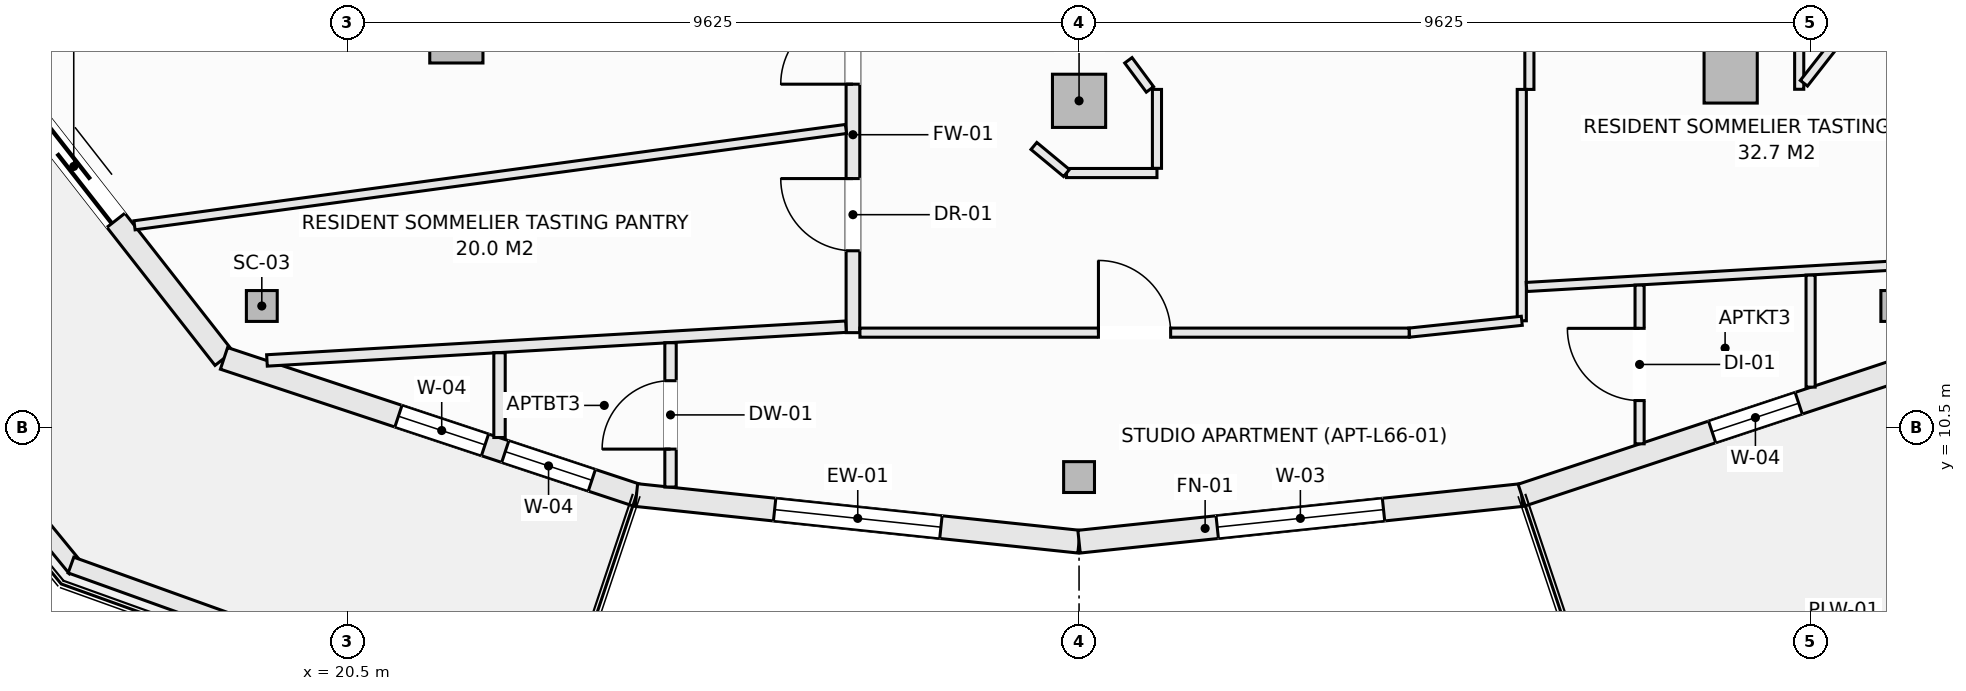
"""IFC4 building model, lengths in metres.
Left out: names, types, materials, properties, quantities, classifications, styles, units other than length and angle.
Written with IfcOpenShell. Run it as: python <this file> out.ifc"""

import sys

from ifc_helpers import new_model, si_unit, direction, frame, frame_2d, origin, origin_2d, place, context, subcontext, project, spatial, rectangle, hollow_rectangle, extrude, element, fill, save


model = new_model("IFC4")
c1 = context("Model", 3, precision=1e-05, world=origin(), true_north=direction((0.0, 1.0)))
c2 = subcontext(c1, "Body", "Model", "MODEL_VIEW")
j1 = project(units=[si_unit("LENGTHUNIT", "METRE"), si_unit("PLANEANGLEUNIT", "RADIAN")], contexts=[c1])
p1 = place(None, origin())
s1 = spatial("IfcSite", under=j1, at=p1, CompositionType="ELEMENT")
p2 = place(p1, origin())
s2 = spatial("IfcBuilding", under=s1, at=p2, CompositionType="ELEMENT")
p3 = place(p2, frame((0.0, 0.0, 245.9)))
s3 = spatial("IfcBuildingStorey", under=s2, at=p3, CompositionType="ELEMENT", Elevation=245.9)
for number, where, z_axis, x_axis in (
    (1, (19.372, 12.101, -0.27), (0.0, 0.0, 1.0), (1.0, 0.0, 0.0)),
    (2, (30.125, 9.85, -0.27), (0.0, 0.0, 1.0), (1.0, 0.0, 0.0)),
    (3, (40.878, 12.101, -0.27), (0.0, 0.0, 1.0), (1.0, 0.0, 0.0)),
):
    element("IfcColumn", number, at=place(p3, frame(where, z_axis=z_axis, x_axis=x_axis)), inside=s3, PredefinedType="COLUMN", context=c2, shape_type="SweptSolid", body=[
        extrude(hollow_rectangle(XDim=0.406, YDim=0.406, WallThickness=0.016, at=origin_2d()), origin(), (0.0, 0.0, 1.0), 3.3),
    ])
for number, where, z_axis, x_axis in (
    (4, (21.932, 15.648, -0.27), (0.0, 0.0, 1.0), (1.0, 0.0, 0.0)),
    (5, (30.125, 14.8, -0.27), (0.0, 0.0, 1.0), (1.0, 0.0, 0.0)),
    (6, (38.698, 15.121, -0.27), (0.0, 0.0, 1.0), (1.0, 0.0, 0.0)),
):
    element("IfcColumn", number, at=place(p3, frame(where, z_axis=z_axis, x_axis=x_axis)), inside=s3, PredefinedType="COLUMN", context=c2, shape_type="SweptSolid", body=[
        extrude(rectangle(XDim=0.7, YDim=0.7, at=origin_2d()), origin(), (0.0, 0.0, 1.0), 3.3),
    ])
p4 = place(p3, frame((15.573, 15.63, 0.0), z_axis=(0.0, 0.0, 1.0), x_axis=(0.61644588519, -0.787397276241, 0.0)))
e7 = element("IfcWall", 7, at=p4, inside=s3, PredefinedType="SOLIDWALL", context=c2, shape_type="SweptSolid", body=[
    extrude(rectangle(XDim=5.357, YDim=0.3, at=frame_2d((2.678, 0.0))), origin(), (0.0, 0.0, 1.0), 2.605),
])
p5 = place(p4, frame((1.25, 0.0, 0.0)))
e8 = element("IfcOpeningElement", 8, at=p5, cuts=e7, PredefinedType="OPENING", context=c2, shape_type="SweptSolid", body=[
    extrude(rectangle(XDim=1.8, YDim=2.25, at=frame_2d((0.9, 1.125))), frame((0.0, 0.16, 0.0), z_axis=(0.0, -1.0, 0.0), x_axis=(1.0, 0.0, 0.0)), (0.0, 0.0, 1.0), 0.32),
])
p6 = place(p3, frame((18.875, 11.412, 0.0), z_axis=(0.0, 0.0, 1.0), x_axis=(0.949232769585, -0.314574552605, 0.0)))
e9 = element("IfcWall", 9, at=p6, inside=s3, PredefinedType="SOLIDWALL", context=c2, shape_type="SweptSolid", body=[
    extrude(rectangle(XDim=5.717, YDim=0.3, at=frame_2d((2.858, 0.0))), origin(), (0.0, 0.0, 1.0), 2.605),
])
p7 = place(p6, frame((2.417, 0.0, 0.72)))
e10 = element("IfcOpeningElement", 10, at=p7, cuts=e9, PredefinedType="OPENING", context=c2, shape_type="SweptSolid", body=[
    extrude(rectangle(XDim=1.2, YDim=1.65, at=frame_2d((0.6, 0.825))), frame((0.0, 0.16, 0.0), z_axis=(0.0, -1.0, 0.0), x_axis=(1.0, 0.0, 0.0)), (0.0, 0.0, 1.0), 0.32),
])
p8 = place(p6, frame((3.898, 0.0, 0.72)))
e11 = element("IfcOpeningElement", 11, at=p8, cuts=e9, PredefinedType="OPENING", context=c2, shape_type="SweptSolid", body=[
    extrude(rectangle(XDim=1.2, YDim=1.65, at=frame_2d((0.6, 0.825))), frame((0.0, 0.16, 0.0), z_axis=(0.0, -1.0, 0.0), x_axis=(1.0, 0.0, 0.0)), (0.0, 0.0, 1.0), 0.32),
])
p9 = place(p3, frame((24.302, 9.613, 0.0), z_axis=(0.0, 0.0, 1.0), x_axis=(0.994500425783, -0.10473253132, 0.0)))
e12 = element("IfcWall", 12, at=p9, inside=s3, PredefinedType="SOLIDWALL", context=c2, shape_type="SweptSolid", body=[
    extrude(rectangle(XDim=5.856, YDim=0.3, at=frame_2d((2.928, 0.0))), origin(), (0.0, 0.0, 1.0), 2.605),
])
p10 = place(p9, frame((1.828, 0.0, 0.72)))
e13 = element("IfcOpeningElement", 13, at=p10, cuts=e12, PredefinedType="OPENING", context=c2, shape_type="SweptSolid", body=[
    extrude(rectangle(XDim=2.2, YDim=1.65, at=frame_2d((1.1, 0.825))), frame((0.0, 0.16, 0.0), z_axis=(0.0, -1.0, 0.0), x_axis=(1.0, 0.0, 0.0)), (0.0, 0.0, 1.0), 0.32),
])
p11 = place(p3, frame((30.125, 9.0, 0.0), z_axis=(0.0, 0.0, 1.0), x_axis=(0.994500425783, 0.10473253132, 0.0)))
e14 = element("IfcWall", 14, at=p11, inside=s3, PredefinedType="SOLIDWALL", context=c2, shape_type="SweptSolid", body=[
    extrude(rectangle(XDim=5.856, YDim=0.3, at=frame_2d((2.928, 0.0))), origin(), (0.0, 0.0, 1.0), 2.605),
])
p12 = place(p11, frame((1.828, 0.0, 0.72)))
e15 = element("IfcOpeningElement", 15, at=p12, cuts=e14, PredefinedType="OPENING", context=c2, shape_type="SweptSolid", body=[
    extrude(rectangle(XDim=2.2, YDim=1.65, at=frame_2d((1.1, 0.825))), frame((0.0, 0.16, 0.0), z_axis=(0.0, -1.0, 0.0), x_axis=(1.0, 0.0, 0.0)), (0.0, 0.0, 1.0), 0.32),
])
p13 = place(p3, frame((35.948, 9.613, 0.0), z_axis=(0.0, 0.0, 1.0), x_axis=(0.949232769585, 0.314574552605, 0.0)))
e16 = element("IfcWall", 16, at=p13, inside=s3, PredefinedType="SOLIDWALL", context=c2, shape_type="SweptSolid", body=[
    extrude(rectangle(XDim=5.717, YDim=0.3, at=frame_2d((2.858, 0.0))), origin(), (0.0, 0.0, 1.0), 2.605),
])
p14 = place(p13, frame((2.64, 0.0, 0.72)))
e17 = element("IfcOpeningElement", 17, at=p14, cuts=e16, PredefinedType="OPENING", context=c2, shape_type="SweptSolid", body=[
    extrude(rectangle(XDim=1.2, YDim=1.65, at=frame_2d((0.6, 0.825))), frame((0.0, 0.16, 0.0), z_axis=(0.0, -1.0, 0.0), x_axis=(1.0, 0.0, 0.0)), (0.0, 0.0, 1.0), 0.32),
])
p15 = place(p3, frame((12.882, 13.579, 0.0), z_axis=(0.0, 0.0, 1.0), x_axis=(0.63407318032, -0.77327304492, 0.0)))
e18 = element("IfcWall", 18, at=p15, inside=s3, PredefinedType="PARAPET", context=c2, shape_type="SweptSolid", body=[
    extrude(rectangle(XDim=6.379, YDim=0.22, at=frame_2d((3.189, 0.0))), origin(), (0.0, 0.0, 1.0), 0.52),
])
for number, where, z_axis, x_axis in (
    (19, (16.862, 8.692, 0.0), (0.0, 0.0, 1.0), (0.941, -0.338, 0.0)),
    (20, (36.982, 6.392, 0.0), (0.0, 0.0, 1.0), (0.941, 0.338, 0.0)),
):
    element("IfcWall", number, at=place(p3, frame(where, z_axis=z_axis, x_axis=x_axis)), inside=s3, PredefinedType="PARAPET", context=c2, shape_type="SweptSolid", body=[
        extrude(rectangle(XDim=6.807, YDim=0.22, at=frame_2d((3.403, 0.0))), origin(), (0.0, 0.0, 1.0), 0.52),
    ])
p16 = place(p3, frame((27.15, 11.75, 0.0), z_axis=(0.0, 0.0, 1.0), x_axis=(0.0, 1.0, 0.0)))
e21 = element("IfcWall", 21, at=p16, inside=s3, PredefinedType="SOLIDWALL", context=c2, shape_type="SweptSolid", body=[
    extrude(rectangle(XDim=5.208, YDim=0.18, at=frame_2d((2.604, 0.0))), origin(), (0.0, 0.0, 1.0), 3.03),
])
p17 = place(p16, frame((3.269, 0.0, 0.0)))
e22 = element("IfcOpeningElement", 22, at=p17, cuts=e21, PredefinedType="OPENING", context=c2, shape_type="SweptSolid", body=[
    extrude(rectangle(XDim=0.95, YDim=2.1, at=frame_2d((0.475, 1.05))), frame((0.0, 0.1, 0.0), z_axis=(0.0, -1.0, 0.0), x_axis=(1.0, 0.0, 0.0)), (0.0, 0.0, 1.0), 0.2),
])
p18 = place(p16, frame((1.077, 0.0, 0.0)))
e23 = element("IfcOpeningElement", 23, at=p18, cuts=e21, PredefinedType="OPENING", context=c2, shape_type="SweptSolid", body=[
    extrude(rectangle(XDim=0.95, YDim=2.1, at=frame_2d((0.475, 1.05))), frame((0.0, 0.1, 0.0), z_axis=(0.0, -1.0, 0.0), x_axis=(1.0, 0.0, 0.0)), (0.0, 0.0, 1.0), 0.2),
])
p19 = place(p3, frame((39.6, 14.952, 0.0), z_axis=(0.0, 0.0, 1.0), x_axis=(0.0, 1.0, 0.0)))
e24 = element("IfcWall", 24, at=p19, inside=s3, PredefinedType="PARTITIONING", context=c2, shape_type="SweptSolid", body=[
    extrude(rectangle(XDim=8.068, YDim=0.12, at=frame_2d((4.034, 0.0))), origin(), (0.0, 0.0, 1.0), 2.478),
])
p20 = place(p19, frame((1.5, 0.0, 0.0)))
e25 = element("IfcOpeningElement", 25, at=p20, cuts=e24, PredefinedType="OPENING", context=c2, shape_type="SweptSolid", body=[
    extrude(rectangle(XDim=0.95, YDim=2.1, at=frame_2d((0.475, 1.05))), frame((0.0, 0.07, 0.0), z_axis=(0.0, -1.0, 0.0), x_axis=(1.0, 0.0, 0.0)), (0.0, 0.0, 1.0), 0.14),
])
p21 = place(p3, frame((39.662, 15.031, 0.0), z_axis=(0.0, 0.0, 1.0), x_axis=(0.616497420092, 0.787356927334, 0.0)))
e26 = element("IfcWall", 26, at=p21, inside=s3, PredefinedType="PARTITIONING", context=c2, shape_type="SweptSolid", body=[
    extrude(rectangle(XDim=2.958, YDim=0.12, at=frame_2d((1.479, 0.0))), origin(), (0.0, 0.0, 1.0), 3.03),
])
p22 = place(p3, frame((36.05, 14.95, 0.0), z_axis=(0.0, 0.0, 1.0), x_axis=(0.0, 1.0, 0.0)))
e27 = element("IfcWall", 27, at=p22, inside=s3, PredefinedType="PARTITIONING", context=c2, shape_type="SweptSolid", body=[
    extrude(rectangle(XDim=2.593, YDim=0.12, at=frame_2d((1.296, 0.0))), origin(), (0.0, 0.0, 1.0), 3.03),
])
p23 = place(p3, frame((35.95, 11.906, 0.0), z_axis=(0.0, 0.0, 1.0), x_axis=(0.0, 1.0, 0.0)))
e28 = element("IfcWall", 28, at=p23, inside=s3, PredefinedType="PARTITIONING", context=c2, shape_type="SweptSolid", body=[
    extrude(rectangle(XDim=3.044, YDim=0.12, at=frame_2d((1.522, 0.0))), origin(), (0.0, 0.0, 1.0), 3.03),
])
p24 = place(p3, frame((34.468, 11.75, 0.0), z_axis=(0.0, 0.0, 1.0), x_axis=(0.994504555135, 0.104693313135, 0.0)))
e29 = element("IfcWall", 29, at=p24, inside=s3, PredefinedType="PARTITIONING", context=c2, shape_type="SweptSolid", body=[
    extrude(rectangle(XDim=1.49, YDim=0.12, at=frame_2d((0.745, 0.0))), origin(), (0.0, 0.0, 1.0), 3.03),
])
p25 = place(p3, frame((27.242, 11.75, 0.0), z_axis=(0.0, 0.0, 1.0), x_axis=(1.0, 0.0, 0.0)))
e30 = element("IfcWall", 30, at=p25, inside=s3, PredefinedType="PARTITIONING", context=c2, shape_type="SweptSolid", body=[
    extrude(rectangle(XDim=7.226, YDim=0.12, at=frame_2d((3.613, 0.0))), origin(), (0.0, 0.0, 1.0), 3.03),
])
p26 = place(p25, frame((3.138, 0.0, 0.0)))
e31 = element("IfcOpeningElement", 31, at=p26, cuts=e30, PredefinedType="OPENING", context=c2, shape_type="SweptSolid", body=[
    extrude(rectangle(XDim=0.95, YDim=2.1, at=frame_2d((0.475, 1.05))), frame((0.0, 0.07, 0.0), z_axis=(0.0, -1.0, 0.0), x_axis=(1.0, 0.0, 0.0)), (0.0, 0.0, 1.0), 0.14),
])
p27 = place(p3, frame((29.96, 13.85, 0.0), z_axis=(0.0, 0.0, 1.0), x_axis=(1.0, 0.0, 0.0)))
e32 = element("IfcWall", 32, at=p27, inside=s3, PredefinedType="PARTITIONING", context=c2, shape_type="SweptSolid", body=[
    extrude(rectangle(XDim=1.19, YDim=0.12, at=frame_2d((0.595, 0.0))), origin(), (0.0, 0.0, 1.0), 3.03),
])
p28 = place(p3, frame((31.15, 13.912, 0.0), z_axis=(0.0, 0.0, 1.0), x_axis=(0.0, 1.0, 0.0)))
e33 = element("IfcWall", 33, at=p28, inside=s3, PredefinedType="PARTITIONING", context=c2, shape_type="SweptSolid", body=[
    extrude(rectangle(XDim=1.038, YDim=0.12, at=frame_2d((0.519, 0.0))), origin(), (0.0, 0.0, 1.0), 3.03),
])
p29 = place(p3, frame((30.774, 15.333, 0.0), z_axis=(0.0, 0.0, 1.0), x_axis=(0.595814974861, -0.803121731577, 0.0)))
e34 = element("IfcWall", 34, at=p29, inside=s3, PredefinedType="PARTITIONING", context=c2, shape_type="SweptSolid", body=[
    extrude(rectangle(XDim=0.477, YDim=0.12, at=frame_2d((0.239, 0.0))), origin(), (0.0, 0.0, 1.0), 3.03),
])
p30 = place(p3, frame((29.531, 14.206, 0.0), z_axis=(0.0, 0.0, 1.0), x_axis=(0.7695479554, -0.638589026166, 0.0)))
e35 = element("IfcWall", 35, at=p30, inside=s3, PredefinedType="PARTITIONING", context=c2, shape_type="SweptSolid", body=[
    extrude(rectangle(XDim=0.557, YDim=0.12, at=frame_2d((0.279, 0.0))), origin(), (0.0, 0.0, 1.0), 3.03),
])
p31 = place(p3, frame((17.698, 13.162, 0.0), z_axis=(0.0, 0.0, 1.0), x_axis=(0.990958840374, 0.134166227808, 0.0)))
e36 = element("IfcWall", 36, at=p31, inside=s3, PredefinedType="PARTITIONING", context=c2, shape_type="SweptSolid", body=[
    extrude(rectangle(XDim=9.446, YDim=0.12, at=frame_2d((4.723, 0.0))), origin(), (0.0, 0.0, 1.0), 3.03),
])
p32 = place(p3, frame((19.44, 11.384, 0.0), z_axis=(0.0, 0.0, 1.0), x_axis=(0.998303266402, 0.058228758288, 0.0)))
e37 = element("IfcWall", 37, at=p32, inside=s3, PredefinedType="PARTITIONING", context=c2, shape_type="SweptSolid", body=[
    extrude(rectangle(XDim=7.631, YDim=0.15, at=frame_2d((3.815, 0.0))), origin(), (0.0, 0.0, 1.0), 2.605),
])
p33 = place(p3, frame((36.012, 12.351, 0.0), z_axis=(0.0, 0.0, 1.0), x_axis=(0.998301967663, 0.058251020246, 0.0)))
e38 = element("IfcWall", 38, at=p33, inside=s3, PredefinedType="PARTITIONING", context=c2, shape_type="SweptSolid", body=[
    extrude(rectangle(XDim=6.199, YDim=0.12, at=frame_2d((3.099, 0.0))), origin(), (0.0, 0.0, 1.0), 2.605),
])
p34 = place(p3, frame((24.75, 9.719, 0.0), z_axis=(0.0, 0.0, 1.0), x_axis=(0.0, 1.0, 0.0)))
e39 = element("IfcWall", 39, at=p34, inside=s3, PredefinedType="PARTITIONING", context=c2, shape_type="SweptSolid", body=[
    extrude(rectangle(XDim=1.898, YDim=0.15, at=frame_2d((0.949, 0.0))), origin(), (0.0, 0.0, 1.0), 2.77),
])
p35 = place(p34, frame((0.499, 0.0, 0.0)))
e40 = element("IfcOpeningElement", 40, at=p35, cuts=e39, PredefinedType="OPENING", context=c2, shape_type="SweptSolid", body=[
    extrude(rectangle(XDim=0.9, YDim=2.1, at=frame_2d((0.45, 1.05))), frame((0.0, 0.085, 0.0), z_axis=(0.0, -1.0, 0.0), x_axis=(1.0, 0.0, 0.0)), (0.0, 0.0, 1.0), 0.17),
])
p36 = place(p3, frame((37.5, 10.288, 0.0), z_axis=(0.0, 0.0, 1.0), x_axis=(0.0, 1.0, 0.0)))
e41 = element("IfcWall", 41, at=p36, inside=s3, PredefinedType="PARTITIONING", context=c2, shape_type="SweptSolid", body=[
    extrude(rectangle(XDim=2.088, YDim=0.12, at=frame_2d((1.044, 0.0))), origin(), (0.0, 0.0, 1.0), 3.03),
])
p37 = place(p36, frame((0.569, 0.0, 0.0)))
e42 = element("IfcOpeningElement", 42, at=p37, cuts=e41, PredefinedType="OPENING", context=c2, shape_type="SweptSolid", body=[
    extrude(rectangle(XDim=0.95, YDim=2.1, at=frame_2d((0.475, 1.05))), frame((0.0, 0.07, 0.0), z_axis=(0.0, -1.0, 0.0), x_axis=(1.0, 0.0, 0.0)), (0.0, 0.0, 1.0), 0.14),
])
p38 = place(p3, frame((39.75, 11.033, 0.0), z_axis=(0.0, 0.0, 1.0), x_axis=(0.0, 1.0, 0.0)))
e43 = element("IfcWall", 43, at=p38, inside=s3, PredefinedType="PARTITIONING", context=c2, shape_type="SweptSolid", body=[
    extrude(rectangle(XDim=1.474, YDim=0.12, at=frame_2d((0.737, 0.0))), origin(), (0.0, 0.0, 1.0), 3.03),
])
p39 = place(p3, frame((22.5, 10.37, 0.0), z_axis=(0.0, 0.0, 1.0), x_axis=(0.0, 1.0, 0.0)))
e44 = element("IfcWall", 44, at=p39, inside=s3, PredefinedType="PARTITIONING", context=c2, shape_type="SweptSolid", body=[
    extrude(rectangle(XDim=1.115, YDim=0.15, at=frame_2d((0.558, 0.0))), origin(), (0.0, 0.0, 1.0), 3.03),
])
p40 = place(p5, frame((1.8, 0.0, 0.0), z_axis=(0.0, 0.0, 1.0), x_axis=(-1.0, 0.0, 0.0)))
e45 = element("IfcDoor", 45, at=p40, inside=s3, OperationType="SLIDING_TO_LEFT", PredefinedType="DOOR", context=c2, shape_type="SweptSolid", body=[
    extrude(rectangle(XDim=1.8, YDim=2.25, at=frame_2d((0.9, 1.125))), frame((0.0, 0.025, 0.0), z_axis=(0.0, -1.0, 0.0), x_axis=(1.0, 0.0, 0.0)), (0.0, 0.0, 1.0), 0.05),
])
fill(e8, e45)
p41 = place(p7, origin())
e46 = element("IfcWindow", 46, at=p41, inside=s3, PartitioningType="SINGLE_PANEL", PredefinedType="WINDOW", context=c2, shape_type="SweptSolid", body=[
    extrude(rectangle(XDim=1.2, YDim=1.65, at=frame_2d((0.6, 0.825))), frame((0.0, 0.03, 0.0), z_axis=(0.0, -1.0, 0.0), x_axis=(1.0, 0.0, 0.0)), (0.0, 0.0, 1.0), 0.06),
])
fill(e10, e46)
p42 = place(p10, origin())
e47 = element("IfcWindow", 47, at=p42, inside=s3, PartitioningType="SINGLE_PANEL", PredefinedType="WINDOW", context=c2, shape_type="SweptSolid", body=[
    extrude(rectangle(XDim=2.2, YDim=1.65, at=frame_2d((1.1, 0.825))), frame((0.0, 0.03, 0.0), z_axis=(0.0, -1.0, 0.0), x_axis=(1.0, 0.0, 0.0)), (0.0, 0.0, 1.0), 0.06),
])
fill(e13, e47)
p43 = place(p12, origin())
e48 = element("IfcWindow", 48, at=p43, inside=s3, PartitioningType="SINGLE_PANEL", PredefinedType="WINDOW", context=c2, shape_type="SweptSolid", body=[
    extrude(rectangle(XDim=2.2, YDim=1.65, at=frame_2d((1.1, 0.825))), frame((0.0, 0.03, 0.0), z_axis=(0.0, -1.0, 0.0), x_axis=(1.0, 0.0, 0.0)), (0.0, 0.0, 1.0), 0.06),
])
fill(e15, e48)
p44 = place(p14, origin())
e49 = element("IfcWindow", 49, at=p44, inside=s3, PartitioningType="SINGLE_PANEL", PredefinedType="WINDOW", context=c2, shape_type="SweptSolid", body=[
    extrude(rectangle(XDim=1.2, YDim=1.65, at=frame_2d((0.6, 0.825))), frame((0.0, 0.03, 0.0), z_axis=(0.0, -1.0, 0.0), x_axis=(1.0, 0.0, 0.0)), (0.0, 0.0, 1.0), 0.06),
])
fill(e17, e49)
p45 = place(p17, origin())
e50 = element("IfcDoor", 50, at=p45, inside=s3, OperationType="SINGLE_SWING_LEFT", PredefinedType="DOOR", context=c2, shape_type="SweptSolid", body=[
    extrude(rectangle(XDim=0.95, YDim=2.1, at=frame_2d((0.475, 1.05))), frame((0.0, 0.025, 0.0), z_axis=(0.0, -1.0, 0.0), x_axis=(1.0, 0.0, 0.0)), (0.0, 0.0, 1.0), 0.05),
])
fill(e22, e50)
p46 = place(p18, origin())
e51 = element("IfcDoor", 51, at=p46, inside=s3, OperationType="SINGLE_SWING_RIGHT", PredefinedType="DOOR", context=c2, shape_type="SweptSolid", body=[
    extrude(rectangle(XDim=0.95, YDim=2.1, at=frame_2d((0.475, 1.05))), frame((0.0, 0.025, 0.0), z_axis=(0.0, -1.0, 0.0), x_axis=(1.0, 0.0, 0.0)), (0.0, 0.0, 1.0), 0.05),
])
fill(e23, e51)
p47 = place(p26, origin())
e52 = element("IfcDoor", 52, at=p47, inside=s3, OperationType="SINGLE_SWING_LEFT", PredefinedType="DOOR", context=c2, shape_type="SweptSolid", body=[
    extrude(rectangle(XDim=0.95, YDim=2.1, at=frame_2d((0.475, 1.05))), frame((0.0, 0.025, 0.0), z_axis=(0.0, -1.0, 0.0), x_axis=(1.0, 0.0, 0.0)), (0.0, 0.0, 1.0), 0.05),
])
fill(e31, e52)
p48 = place(p37, origin())
e53 = element("IfcDoor", 53, at=p48, inside=s3, OperationType="SINGLE_SWING_RIGHT", PredefinedType="DOOR", context=c2, shape_type="SweptSolid", body=[
    extrude(rectangle(XDim=0.95, YDim=2.1, at=frame_2d((0.475, 1.05))), frame((0.0, 0.025, 0.0), z_axis=(0.0, -1.0, 0.0), x_axis=(1.0, 0.0, 0.0)), (0.0, 0.0, 1.0), 0.05),
])
fill(e42, e53)
p49 = place(p35, origin())
e54 = element("IfcDoor", 54, at=p49, inside=s3, OperationType="SINGLE_SWING_LEFT", PredefinedType="DOOR", context=c2, shape_type="SweptSolid", body=[
    extrude(rectangle(XDim=0.9, YDim=2.1, at=frame_2d((0.45, 1.05))), frame((0.0, 0.025, 0.0), z_axis=(0.0, -1.0, 0.0), x_axis=(1.0, 0.0, 0.0)), (0.0, 0.0, 1.0), 0.05),
])
fill(e40, e54)
p50 = place(p8, origin())
e55 = element("IfcWindow", 55, at=p50, inside=s3, PartitioningType="SINGLE_PANEL", PredefinedType="WINDOW", context=c2, shape_type="SweptSolid", body=[
    extrude(rectangle(XDim=1.2, YDim=1.65, at=frame_2d((0.6, 0.825))), frame((0.0, 0.03, 0.0), z_axis=(0.0, -1.0, 0.0), x_axis=(1.0, 0.0, 0.0)), (0.0, 0.0, 1.0), 0.06),
])
fill(e11, e55)
save(model, sys.argv[1])
